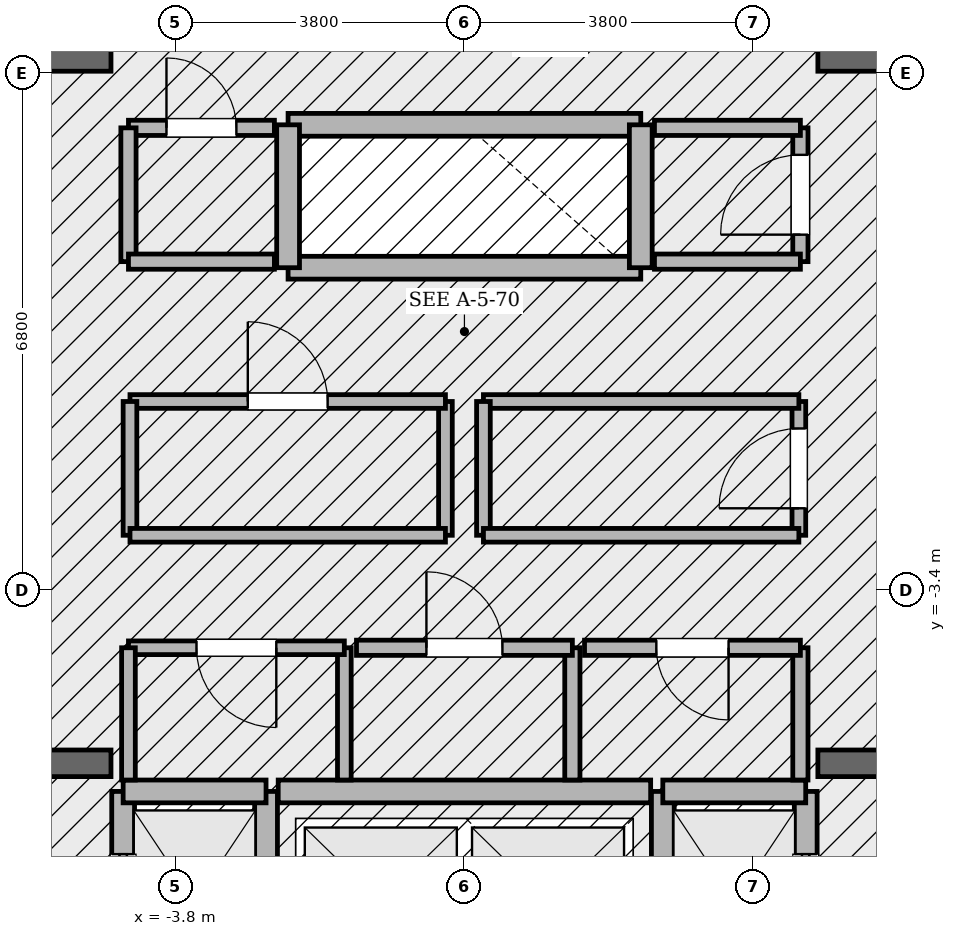
"""IFC4 building model, lengths in metres.
Left out: names, types, materials, properties, quantities, classifications, styles, units other than length and angle.
Written with IfcOpenShell. Run it as: python <this file> out.ifc"""

import sys

from ifc_helpers import new_model, si_unit, direction, frame, frame_2d, origin, place, context, subcontext, project, spatial, rectangle, extrude, element, fill, save


model = new_model("IFC4")
c1 = context("Model", 3, precision=1e-05, world=origin(), true_north=direction((0.0, 1.0)))
c2 = subcontext(c1, "Body", "Model", "MODEL_VIEW")
j1 = project(units=[si_unit("LENGTHUNIT", "METRE"), si_unit("PLANEANGLEUNIT", "RADIAN")], contexts=[c1])
p1 = place(None, origin())
s1 = spatial("IfcSite", under=j1, at=p1, CompositionType="ELEMENT")
p2 = place(p1, origin())
s2 = spatial("IfcBuilding", under=s1, at=p2, CompositionType="ELEMENT")
p3 = place(p2, frame((0.0, 0.0, 334.2)))
s3 = spatial("IfcBuildingStorey", under=s2, at=p3, CompositionType="ELEMENT", Elevation=334.2)
p4 = place(p3, frame((-9.975, -5.68, 0.0), z_axis=(0.0, 0.0, 1.0), x_axis=(1.0, 0.0, 0.0)))
e1 = element("IfcWall", 1, at=p4, inside=s3, PredefinedType="SOLIDWALL", context=c2, shape_type="SweptSolid", body=[
    extrude(rectangle(XDim=5.325, YDim=0.35, at=frame_2d((2.663, 0.0))), origin(), (0.0, 0.0, 1.0), 4.8),
])
p5 = place(p4, frame((1.435, 0.0, 0.0)))
e2 = element("IfcOpeningElement", 2, at=p5, cuts=e1, PredefinedType="OPENING", context=c2, shape_type="SweptSolid", body=[
    extrude(rectangle(XDim=1.18, YDim=2.2, at=frame_2d((0.59, 1.1))), frame((0.0, 0.185, 0.0), z_axis=(0.0, -1.0, 0.0), x_axis=(1.0, 0.0, 0.0)), (0.0, 0.0, 1.0), 0.37),
])
p6 = place(p3, frame((4.65, -5.68, 0.0), z_axis=(0.0, 0.0, 1.0), x_axis=(1.0, 0.0, 0.0)))
e3 = element("IfcWall", 3, at=p6, inside=s3, PredefinedType="SOLIDWALL", context=c2, shape_type="SweptSolid", body=[
    extrude(rectangle(XDim=5.325, YDim=0.35, at=frame_2d((2.663, 0.0))), origin(), (0.0, 0.0, 1.0), 4.8),
])
p7 = place(p6, frame((2.71, 0.0, 0.0)))
e4 = element("IfcOpeningElement", 4, at=p7, cuts=e3, PredefinedType="OPENING", context=c2, shape_type="SweptSolid", body=[
    extrude(rectangle(XDim=1.18, YDim=2.2, at=frame_2d((0.59, 1.1))), frame((0.0, 0.185, 0.0), z_axis=(0.0, -1.0, 0.0), x_axis=(1.0, 0.0, 0.0)), (0.0, 0.0, 1.0), 0.37),
])
for number, where, z_axis, x_axis in (
    (5, (-9.975, 3.6, 0.0), (0.0, 0.0, 1.0), (1.0, 0.0, 0.0)),
    (6, (4.65, 3.6, 0.0), (0.0, 0.0, 1.0), (1.0, 0.0, 0.0)),
):
    element("IfcWall", number, at=place(p3, frame(where, z_axis=z_axis, x_axis=x_axis)), inside=s3, PredefinedType="SOLIDWALL", context=c2, shape_type="SweptSolid", body=[
        extrude(rectangle(XDim=5.325, YDim=0.35, at=frame_2d((2.663, 0.0))), origin(), (0.0, 0.0, 1.0), 4.8),
    ])
p8 = place(p3, frame((-4.49, -8.82, 0.0), z_axis=(0.0, 0.0, 1.0), x_axis=(0.0, 1.0, 0.0)))
e7 = element("IfcWall", 7, at=p8, inside=s3, PredefinedType="SOLIDWALL", context=c2, shape_type="SweptSolid", body=[
    extrude(rectangle(XDim=2.77, YDim=0.3, at=frame_2d((1.385, 0.0))), origin(), (0.0, 0.0, 1.0), 4.54),
])
p9 = place(p8, frame((0.825, 0.0, 0.0)))
e8 = element("IfcOpeningElement", 8, at=p9, cuts=e7, PredefinedType="OPENING", context=c2, shape_type="SweptSolid", body=[
    extrude(rectangle(XDim=1.12, YDim=2.25, at=frame_2d((0.56, 1.125))), frame((0.0, 0.16, 0.0), z_axis=(0.0, -1.0, 0.0), x_axis=(1.0, 0.0, 0.0)), (0.0, 0.0, 1.0), 0.32),
])
p10 = place(p3, frame((-2.61, -8.82, 0.0), z_axis=(0.0, 0.0, 1.0), x_axis=(0.0, 1.0, 0.0)))
e9 = element("IfcWall", 9, at=p10, inside=s3, PredefinedType="SOLIDWALL", context=c2, shape_type="SweptSolid", body=[
    extrude(rectangle(XDim=2.77, YDim=0.3, at=frame_2d((1.385, 0.0))), origin(), (0.0, 0.0, 1.0), 4.54),
])
p11 = place(p3, frame((-4.49, -6.05, 0.0), z_axis=(0.0, 0.0, 1.0), x_axis=(1.0, 0.0, 0.0)))
e10 = element("IfcWall", 10, at=p11, inside=s3, PredefinedType="SOLIDWALL", context=c2, shape_type="SweptSolid", body=[
    extrude(rectangle(XDim=1.88, YDim=0.3, at=frame_2d((0.94, 0.0))), origin(), (0.0, 0.0, 1.0), 4.54),
])
p12 = place(p3, frame((4.49, -8.82, 0.0), z_axis=(0.0, 0.0, 1.0), x_axis=(0.0, 1.0, 0.0)))
e11 = element("IfcWall", 11, at=p12, inside=s3, PredefinedType="SOLIDWALL", context=c2, shape_type="SweptSolid", body=[
    extrude(rectangle(XDim=2.77, YDim=0.3, at=frame_2d((1.385, 0.0))), origin(), (0.0, 0.0, 1.0), 4.54),
])
p13 = place(p12, frame((0.825, 0.0, 0.0)))
e12 = element("IfcOpeningElement", 12, at=p13, cuts=e11, PredefinedType="OPENING", context=c2, shape_type="SweptSolid", body=[
    extrude(rectangle(XDim=1.12, YDim=2.25, at=frame_2d((0.56, 1.125))), frame((0.0, 0.16, 0.0), z_axis=(0.0, -1.0, 0.0), x_axis=(1.0, 0.0, 0.0)), (0.0, 0.0, 1.0), 0.32),
])
p14 = place(p3, frame((2.61, -8.82, 0.0), z_axis=(0.0, 0.0, 1.0), x_axis=(0.0, 1.0, 0.0)))
e13 = element("IfcWall", 13, at=p14, inside=s3, PredefinedType="SOLIDWALL", context=c2, shape_type="SweptSolid", body=[
    extrude(rectangle(XDim=2.77, YDim=0.3, at=frame_2d((1.385, 0.0))), origin(), (0.0, 0.0, 1.0), 4.54),
])
p15 = place(p3, frame((2.61, -6.05, 0.0), z_axis=(0.0, 0.0, 1.0), x_axis=(1.0, 0.0, 0.0)))
e14 = element("IfcWall", 14, at=p15, inside=s3, PredefinedType="SOLIDWALL", context=c2, shape_type="SweptSolid", body=[
    extrude(rectangle(XDim=1.88, YDim=0.3, at=frame_2d((0.94, 0.0))), origin(), (0.0, 0.0, 1.0), 4.54),
])
for number, where, z_axis, x_axis in (
    (15, (-2.32, 0.84, 0.0), (0.0, 0.0, 1.0), (1.0, 0.0, 0.0)),
    (16, (-2.32, 2.72, 0.0), (0.0, 0.0, 1.0), (1.0, 0.0, 0.0)),
):
    element("IfcWall", number, at=place(p3, frame(where, z_axis=z_axis, x_axis=x_axis)), inside=s3, PredefinedType="SOLIDWALL", context=c2, shape_type="SweptSolid", body=[
        extrude(rectangle(XDim=4.64, YDim=0.3, at=frame_2d((2.32, 0.0))), origin(), (0.0, 0.0, 1.0), 4.54),
    ])
for number, where, z_axis, x_axis in (
    (17, (-2.32, 0.84, 0.0), (0.0, 0.0, 1.0), (0.0, 1.0, 0.0)),
    (18, (2.32, 0.84, 0.0), (0.0, 0.0, 1.0), (0.0, 1.0, 0.0)),
):
    element("IfcWall", number, at=place(p3, frame(where, z_axis=z_axis, x_axis=x_axis)), inside=s3, PredefinedType="SOLIDWALL", context=c2, shape_type="SweptSolid", body=[
        extrude(rectangle(XDim=1.88, YDim=0.3, at=frame_2d((0.94, 0.0))), origin(), (0.0, 0.0, 1.0), 4.54),
    ])
p16 = place(p3, frame((-2.45, -6.05, 0.0), z_axis=(0.0, 0.0, 1.0), x_axis=(1.0, 0.0, 0.0)))
e19 = element("IfcWall", 19, at=p16, inside=s3, PredefinedType="SOLIDWALL", context=c2, shape_type="SweptSolid", body=[
    extrude(rectangle(XDim=4.9, YDim=0.3, at=frame_2d((2.45, 0.0))), origin(), (0.0, 0.0, 1.0), 4.54),
])
p17 = place(p3, frame((-1.58, -5.9, 0.0), z_axis=(0.0, 0.0, 1.0), x_axis=(0.0, 1.0, 0.0)))
e20 = element("IfcWall", 20, at=p17, inside=s3, PredefinedType="PARTITIONING", context=c2, shape_type="SweptSolid", body=[
    extrude(rectangle(XDim=1.74, YDim=0.18, at=frame_2d((0.87, 0.0))), origin(), (0.0, 0.0, 1.0), 4.54),
])
p18 = place(p3, frame((-1.58, -4.16, 0.0), z_axis=(0.0, 0.0, 1.0), x_axis=(-1.0, 0.0, 0.0)))
e21 = element("IfcWall", 21, at=p18, inside=s3, PredefinedType="PARTITIONING", context=c2, shape_type="SweptSolid", body=[
    extrude(rectangle(XDim=2.84, YDim=0.18, at=frame_2d((1.42, 0.0))), origin(), (0.0, 0.0, 1.0), 4.54),
])
p19 = place(p18, frame((0.895, 0.0, 0.0)))
e22 = element("IfcOpeningElement", 22, at=p19, cuts=e21, PredefinedType="OPENING", context=c2, shape_type="SweptSolid", body=[
    extrude(rectangle(XDim=1.05, YDim=2.2, at=frame_2d((0.525, 1.1))), frame((0.0, 0.1, 0.0), z_axis=(0.0, -1.0, 0.0), x_axis=(1.0, 0.0, 0.0)), (0.0, 0.0, 1.0), 0.2),
])
p20 = place(p3, frame((-4.42, -4.16, 0.0), z_axis=(0.0, 0.0, 1.0), x_axis=(0.0, -1.0, 0.0)))
e23 = element("IfcWall", 23, at=p20, inside=s3, PredefinedType="PARTITIONING", context=c2, shape_type="SweptSolid", body=[
    extrude(rectangle(XDim=1.74, YDim=0.18, at=frame_2d((0.87, 0.0))), origin(), (0.0, 0.0, 1.0), 4.54),
])
p21 = place(p3, frame((1.42, -5.9, 0.0), z_axis=(0.0, 0.0, 1.0), x_axis=(0.0, 1.0, 0.0)))
e24 = element("IfcWall", 24, at=p21, inside=s3, PredefinedType="SOLIDWALL", context=c2, shape_type="SweptSolid", body=[
    extrude(rectangle(XDim=1.74, YDim=0.2, at=frame_2d((0.87, 0.0))), origin(), (0.0, 0.0, 1.0), 4.54),
])
p22 = place(p3, frame((1.42, -4.16, 0.0), z_axis=(0.0, 0.0, 1.0), x_axis=(-1.0, 0.0, 0.0)))
e25 = element("IfcWall", 25, at=p22, inside=s3, PredefinedType="SOLIDWALL", context=c2, shape_type="SweptSolid", body=[
    extrude(rectangle(XDim=2.84, YDim=0.2, at=frame_2d((1.42, 0.0))), origin(), (0.0, 0.0, 1.0), 4.54),
])
p23 = place(p22, frame((0.92, 0.0, 0.0)))
e26 = element("IfcOpeningElement", 26, at=p23, cuts=e25, PredefinedType="OPENING", context=c2, shape_type="SweptSolid", body=[
    extrude(rectangle(XDim=1.0, YDim=2.15, at=frame_2d((0.5, 1.075))), frame((0.0, 0.11, 0.0), z_axis=(0.0, -1.0, 0.0), x_axis=(1.0, 0.0, 0.0)), (0.0, 0.0, 1.0), 0.22),
])
p24 = place(p3, frame((4.42, -5.9, 0.0), z_axis=(0.0, 0.0, 1.0), x_axis=(0.0, 1.0, 0.0)))
e27 = element("IfcWall", 27, at=p24, inside=s3, PredefinedType="SOLIDWALL", context=c2, shape_type="SweptSolid", body=[
    extrude(rectangle(XDim=1.74, YDim=0.2, at=frame_2d((0.87, 0.0))), origin(), (0.0, 0.0, 1.0), 4.54),
])
p25 = place(p3, frame((4.42, -4.16, 0.0), z_axis=(0.0, 0.0, 1.0), x_axis=(-1.0, 0.0, 0.0)))
e28 = element("IfcWall", 28, at=p25, inside=s3, PredefinedType="SOLIDWALL", context=c2, shape_type="SweptSolid", body=[
    extrude(rectangle(XDim=2.84, YDim=0.2, at=frame_2d((1.42, 0.0))), origin(), (0.0, 0.0, 1.0), 4.54),
])
p26 = place(p25, frame((0.945, 0.0, 0.0)))
e29 = element("IfcOpeningElement", 29, at=p26, cuts=e28, PredefinedType="OPENING", context=c2, shape_type="SweptSolid", body=[
    extrude(rectangle(XDim=0.95, YDim=2.15, at=frame_2d((0.475, 1.075))), frame((0.0, 0.11, 0.0), z_axis=(0.0, -1.0, 0.0), x_axis=(1.0, 0.0, 0.0)), (0.0, 0.0, 1.0), 0.22),
])
p27 = place(p3, frame((-0.25, -2.68, 0.0), z_axis=(0.0, 0.0, 1.0), x_axis=(0.0, 1.0, 0.0)))
e30 = element("IfcWall", 30, at=p27, inside=s3, PredefinedType="PARTITIONING", context=c2, shape_type="SweptSolid", body=[
    extrude(rectangle(XDim=1.76, YDim=0.18, at=frame_2d((0.88, 0.0))), origin(), (0.0, 0.0, 1.0), 4.54),
])
p28 = place(p3, frame((-0.25, -0.92, 0.0), z_axis=(0.0, 0.0, 1.0), x_axis=(-1.0, 0.0, 0.0)))
e31 = element("IfcWall", 31, at=p28, inside=s3, PredefinedType="PARTITIONING", context=c2, shape_type="SweptSolid", body=[
    extrude(rectangle(XDim=4.15, YDim=0.18, at=frame_2d((2.075, 0.0))), origin(), (0.0, 0.0, 1.0), 4.54),
])
p29 = place(p28, frame((1.55, 0.0, 0.0)))
e32 = element("IfcOpeningElement", 32, at=p29, cuts=e31, PredefinedType="OPENING", context=c2, shape_type="SweptSolid", body=[
    extrude(rectangle(XDim=1.05, YDim=2.2, at=frame_2d((0.525, 1.1))), frame((0.0, 0.1, 0.0), z_axis=(0.0, -1.0, 0.0), x_axis=(1.0, 0.0, 0.0)), (0.0, 0.0, 1.0), 0.2),
])
p30 = place(p3, frame((-4.4, -0.92, 0.0), z_axis=(0.0, 0.0, 1.0), x_axis=(0.0, -1.0, 0.0)))
e33 = element("IfcWall", 33, at=p30, inside=s3, PredefinedType="PARTITIONING", context=c2, shape_type="SweptSolid", body=[
    extrude(rectangle(XDim=1.76, YDim=0.18, at=frame_2d((0.88, 0.0))), origin(), (0.0, 0.0, 1.0), 4.54),
])
p31 = place(p3, frame((-4.4, -2.68, 0.0), z_axis=(0.0, 0.0, 1.0), x_axis=(1.0, 0.0, 0.0)))
e34 = element("IfcWall", 34, at=p31, inside=s3, PredefinedType="PARTITIONING", context=c2, shape_type="SweptSolid", body=[
    extrude(rectangle(XDim=4.15, YDim=0.18, at=frame_2d((2.075, 0.0))), origin(), (0.0, 0.0, 1.0), 4.54),
])
p32 = place(p3, frame((4.4, -2.68, 0.0), z_axis=(0.0, 0.0, 1.0), x_axis=(0.0, 1.0, 0.0)))
e35 = element("IfcWall", 35, at=p32, inside=s3, PredefinedType="PARTITIONING", context=c2, shape_type="SweptSolid", body=[
    extrude(rectangle(XDim=1.76, YDim=0.18, at=frame_2d((0.88, 0.0))), origin(), (0.0, 0.0, 1.0), 4.54),
])
p33 = place(p32, frame((0.355, 0.0, 0.0)))
e36 = element("IfcOpeningElement", 36, at=p33, cuts=e35, PredefinedType="OPENING", context=c2, shape_type="SweptSolid", body=[
    extrude(rectangle(XDim=1.05, YDim=2.2, at=frame_2d((0.525, 1.1))), frame((0.0, 0.1, 0.0), z_axis=(0.0, -1.0, 0.0), x_axis=(1.0, 0.0, 0.0)), (0.0, 0.0, 1.0), 0.2),
])
p34 = place(p3, frame((4.4, -0.92, 0.0), z_axis=(0.0, 0.0, 1.0), x_axis=(-1.0, 0.0, 0.0)))
e37 = element("IfcWall", 37, at=p34, inside=s3, PredefinedType="PARTITIONING", context=c2, shape_type="SweptSolid", body=[
    extrude(rectangle(XDim=4.15, YDim=0.18, at=frame_2d((2.075, 0.0))), origin(), (0.0, 0.0, 1.0), 4.54),
])
p35 = place(p3, frame((0.25, -0.92, 0.0), z_axis=(0.0, 0.0, 1.0), x_axis=(0.0, -1.0, 0.0)))
e38 = element("IfcWall", 38, at=p35, inside=s3, PredefinedType="PARTITIONING", context=c2, shape_type="SweptSolid", body=[
    extrude(rectangle(XDim=1.76, YDim=0.18, at=frame_2d((0.88, 0.0))), origin(), (0.0, 0.0, 1.0), 4.54),
])
p36 = place(p3, frame((0.25, -2.68, 0.0), z_axis=(0.0, 0.0, 1.0), x_axis=(1.0, 0.0, 0.0)))
e39 = element("IfcWall", 39, at=p36, inside=s3, PredefinedType="PARTITIONING", context=c2, shape_type="SweptSolid", body=[
    extrude(rectangle(XDim=4.15, YDim=0.18, at=frame_2d((2.075, 0.0))), origin(), (0.0, 0.0, 1.0), 4.54),
])
p37 = place(p3, frame((-2.5, 2.68, 0.0), z_axis=(0.0, 0.0, 1.0), x_axis=(-1.0, 0.0, 0.0)))
e40 = element("IfcWall", 40, at=p37, inside=s3, PredefinedType="SOLIDWALL", context=c2, shape_type="SweptSolid", body=[
    extrude(rectangle(XDim=1.92, YDim=0.2, at=frame_2d((0.96, 0.0))), origin(), (0.0, 0.0, 1.0), 4.54),
])
p38 = place(p37, frame((0.5, 0.0, 0.0)))
e41 = element("IfcOpeningElement", 41, at=p38, cuts=e40, PredefinedType="OPENING", context=c2, shape_type="SweptSolid", body=[
    extrude(rectangle(XDim=0.92, YDim=2.1, at=frame_2d((0.46, 1.05))), frame((0.0, 0.11, 0.0), z_axis=(0.0, -1.0, 0.0), x_axis=(1.0, 0.0, 0.0)), (0.0, 0.0, 1.0), 0.22),
])
p39 = place(p3, frame((-4.42, 2.68, 0.0), z_axis=(0.0, 0.0, 1.0), x_axis=(0.0, -1.0, 0.0)))
e42 = element("IfcWall", 42, at=p39, inside=s3, PredefinedType="SOLIDWALL", context=c2, shape_type="SweptSolid", body=[
    extrude(rectangle(XDim=1.76, YDim=0.2, at=frame_2d((0.88, 0.0))), origin(), (0.0, 0.0, 1.0), 4.54),
])
p40 = place(p3, frame((-4.42, 0.92, 0.0), z_axis=(0.0, 0.0, 1.0), x_axis=(1.0, 0.0, 0.0)))
e43 = element("IfcWall", 43, at=p40, inside=s3, PredefinedType="SOLIDWALL", context=c2, shape_type="SweptSolid", body=[
    extrude(rectangle(XDim=1.92, YDim=0.2, at=frame_2d((0.96, 0.0))), origin(), (0.0, 0.0, 1.0), 4.54),
])
p41 = place(p3, frame((4.42, 0.92, 0.0), z_axis=(0.0, 0.0, 1.0), x_axis=(0.0, 1.0, 0.0)))
e44 = element("IfcWall", 44, at=p41, inside=s3, PredefinedType="SOLIDWALL", context=c2, shape_type="SweptSolid", body=[
    extrude(rectangle(XDim=1.76, YDim=0.2, at=frame_2d((0.88, 0.0))), origin(), (0.0, 0.0, 1.0), 4.54),
])
p42 = place(p41, frame((0.355, 0.0, 0.0)))
e45 = element("IfcOpeningElement", 45, at=p42, cuts=e44, PredefinedType="OPENING", context=c2, shape_type="SweptSolid", body=[
    extrude(rectangle(XDim=1.05, YDim=2.2, at=frame_2d((0.525, 1.1))), frame((0.0, 0.11, 0.0), z_axis=(0.0, -1.0, 0.0), x_axis=(1.0, 0.0, 0.0)), (0.0, 0.0, 1.0), 0.22),
])
for number, where, z_axis, x_axis in (
    (46, (4.42, 2.68, 0.0), (0.0, 0.0, 1.0), (-1.0, 0.0, 0.0)),
    (47, (2.5, 0.92, 0.0), (0.0, 0.0, 1.0), (1.0, 0.0, 0.0)),
):
    element("IfcWall", number, at=place(p3, frame(where, z_axis=z_axis, x_axis=x_axis)), inside=s3, PredefinedType="SOLIDWALL", context=c2, shape_type="SweptSolid", body=[
        extrude(rectangle(XDim=1.92, YDim=0.2, at=frame_2d((0.96, 0.0))), origin(), (0.0, 0.0, 1.0), 4.54),
    ])
p43 = place(p9, origin())
e48 = element("IfcDoor", 48, at=p43, inside=s3, OperationType="SLIDING_TO_LEFT", PredefinedType="DOOR", context=c2, shape_type="SweptSolid", body=[
    extrude(rectangle(XDim=1.12, YDim=2.25, at=frame_2d((0.56, 1.125))), frame((0.0, 0.025, 0.0), z_axis=(0.0, -1.0, 0.0), x_axis=(1.0, 0.0, 0.0)), (0.0, 0.0, 1.0), 0.05),
])
fill(e8, e48)
p44 = place(p13, origin())
e49 = element("IfcDoor", 49, at=p44, inside=s3, OperationType="SLIDING_TO_RIGHT", PredefinedType="DOOR", context=c2, shape_type="SweptSolid", body=[
    extrude(rectangle(XDim=1.12, YDim=2.25, at=frame_2d((0.56, 1.125))), frame((0.0, 0.025, 0.0), z_axis=(0.0, -1.0, 0.0), x_axis=(1.0, 0.0, 0.0)), (0.0, 0.0, 1.0), 0.05),
])
fill(e12, e49)
p45 = place(p19, origin())
e50 = element("IfcDoor", 50, at=p45, inside=s3, OperationType="SINGLE_SWING_LEFT", PredefinedType="DOOR", context=c2, shape_type="SweptSolid", body=[
    extrude(rectangle(XDim=1.05, YDim=2.2, at=frame_2d((0.525, 1.1))), frame((0.0, 0.025, 0.0), z_axis=(0.0, -1.0, 0.0), x_axis=(1.0, 0.0, 0.0)), (0.0, 0.0, 1.0), 0.05),
])
fill(e22, e50)
p46 = place(p23, origin())
e51 = element("IfcDoor", 51, at=p46, inside=s3, OperationType="SINGLE_SWING_RIGHT", PredefinedType="DOOR", context=c2, shape_type="SweptSolid", body=[
    extrude(rectangle(XDim=1.0, YDim=2.15, at=frame_2d((0.5, 1.075))), frame((0.0, 0.025, 0.0), z_axis=(0.0, -1.0, 0.0), x_axis=(1.0, 0.0, 0.0)), (0.0, 0.0, 1.0), 0.05),
])
fill(e26, e51)
p47 = place(p26, origin())
e52 = element("IfcDoor", 52, at=p47, inside=s3, OperationType="SINGLE_SWING_LEFT", PredefinedType="DOOR", context=c2, shape_type="SweptSolid", body=[
    extrude(rectangle(XDim=0.95, YDim=2.15, at=frame_2d((0.475, 1.075))), frame((0.0, 0.025, 0.0), z_axis=(0.0, -1.0, 0.0), x_axis=(1.0, 0.0, 0.0)), (0.0, 0.0, 1.0), 0.05),
])
fill(e29, e52)
p48 = place(p29, origin())
e53 = element("IfcDoor", 53, at=p48, inside=s3, OperationType="SINGLE_SWING_RIGHT", PredefinedType="DOOR", context=c2, shape_type="SweptSolid", body=[
    extrude(rectangle(XDim=1.05, YDim=2.2, at=frame_2d((0.525, 1.1))), frame((0.0, 0.025, 0.0), z_axis=(0.0, -1.0, 0.0), x_axis=(1.0, 0.0, 0.0)), (0.0, 0.0, 1.0), 0.05),
])
fill(e32, e53)
p49 = place(p33, origin())
e54 = element("IfcDoor", 54, at=p49, inside=s3, OperationType="SINGLE_SWING_LEFT", PredefinedType="DOOR", context=c2, shape_type="SweptSolid", body=[
    extrude(rectangle(XDim=1.05, YDim=2.2, at=frame_2d((0.525, 1.1))), frame((0.0, 0.025, 0.0), z_axis=(0.0, -1.0, 0.0), x_axis=(1.0, 0.0, 0.0)), (0.0, 0.0, 1.0), 0.05),
])
fill(e36, e54)
p50 = place(p38, origin())
e55 = element("IfcDoor", 55, at=p50, inside=s3, OperationType="SINGLE_SWING_RIGHT", PredefinedType="DOOR", context=c2, shape_type="SweptSolid", body=[
    extrude(rectangle(XDim=0.92, YDim=2.1, at=frame_2d((0.46, 1.05))), frame((0.0, 0.025, 0.0), z_axis=(0.0, -1.0, 0.0), x_axis=(1.0, 0.0, 0.0)), (0.0, 0.0, 1.0), 0.05),
])
fill(e41, e55)
p51 = place(p42, origin())
e56 = element("IfcDoor", 56, at=p51, inside=s3, OperationType="SINGLE_SWING_LEFT", PredefinedType="DOOR", context=c2, shape_type="SweptSolid", body=[
    extrude(rectangle(XDim=1.05, YDim=2.2, at=frame_2d((0.525, 1.1))), frame((0.0, 0.025, 0.0), z_axis=(0.0, -1.0, 0.0), x_axis=(1.0, 0.0, 0.0)), (0.0, 0.0, 1.0), 0.05),
])
fill(e45, e56)
save(model, sys.argv[1])
